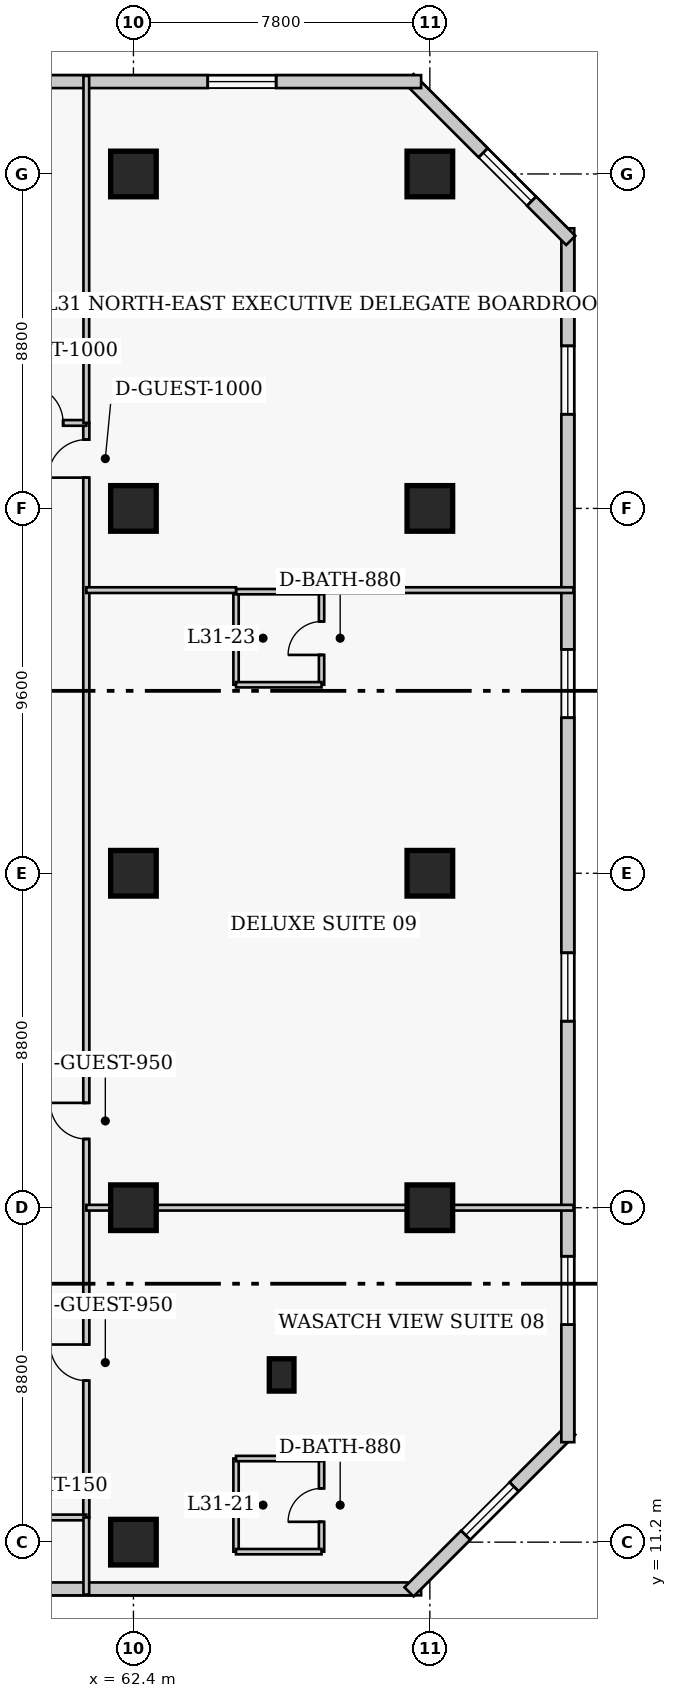
"""IFC4 building model, lengths in metres.
Left out: names, types, materials, properties, quantities, classifications, styles, units other than length and angle.
Written with IfcOpenShell. Run it as: python <this file> out.ifc"""

import sys

from ifc_helpers import new_model, si_unit, direction, frame, frame_2d, origin, origin_2d, place, context, subcontext, project, spatial, rectangle, extrude, element, fill, save


model = new_model("IFC4")
c1 = context("Model", 3, precision=1e-05, world=origin(), true_north=direction((0.0, 1.0)))
c2 = subcontext(c1, "Body", "Model", "MODEL_VIEW")
j1 = project(units=[si_unit("LENGTHUNIT", "METRE"), si_unit("PLANEANGLEUNIT", "RADIAN")], contexts=[c1])
p1 = place(None, origin())
s1 = spatial("IfcSite", under=j1, at=p1, CompositionType="ELEMENT")
p2 = place(p1, origin())
s2 = spatial("IfcBuilding", under=s1, at=p2, CompositionType="ELEMENT")
p3 = place(p2, frame((0.0, 0.0, 126.0)))
s3 = spatial("IfcBuildingStorey", under=s2, at=p3, CompositionType="ELEMENT", Elevation=126.0)
for number, where, z_axis, x_axis in (
    (1, (62.4, 11.2, 0.0), (0.0, 0.0, 1.0), (1.0, 0.0, 0.0)),
    (2, (62.4, 20.0, 0.0), (0.0, 0.0, 1.0), (1.0, 0.0, 0.0)),
    (3, (62.4, 28.8, 0.0), (0.0, 0.0, 1.0), (1.0, 0.0, 0.0)),
    (4, (62.4, 38.4, 0.0), (0.0, 0.0, 1.0), (1.0, 0.0, 0.0)),
    (5, (62.4, 47.2, 0.0), (0.0, 0.0, 1.0), (1.0, 0.0, 0.0)),
    (6, (70.2, 20.0, 0.0), (0.0, 0.0, 1.0), (1.0, 0.0, 0.0)),
    (7, (70.2, 28.8, 0.0), (0.0, 0.0, 1.0), (1.0, 0.0, 0.0)),
    (8, (70.2, 38.4, 0.0), (0.0, 0.0, 1.0), (1.0, 0.0, 0.0)),
    (9, (70.2, 47.2, 0.0), (0.0, 0.0, 1.0), (1.0, 0.0, 0.0)),
):
    element("IfcColumn", number, at=place(p3, frame(where, z_axis=z_axis, x_axis=x_axis)), inside=s3, PredefinedType="COLUMN", context=c2, shape_type="SweptSolid", body=[
        extrude(rectangle(XDim=1.2, YDim=1.2, at=origin_2d()), origin(), (0.0, 0.0, 1.0), 3.8),
    ])
p4 = place(p3, frame((66.3, 15.6, 0.0), z_axis=(0.0, 0.0, 1.0), x_axis=(1.0, 0.0, 0.0)))
e10 = element("IfcColumn", 10, at=p4, inside=s3, PredefinedType="PILASTER", context=c2, shape_type="SweptSolid", body=[
    extrude(rectangle(XDim=0.65, YDim=0.85, at=origin_2d()), origin(), (0.0, 0.0, 1.0), 3.8),
])
p5 = place(p3, frame((41.68, 9.97, 0.0), z_axis=(0.0, 0.0, 1.0), x_axis=(1.0, 0.0, 0.0)))
e11 = element("IfcWall", 11, at=p5, inside=s3, PredefinedType="SOLIDWALL", context=c2, shape_type="SweptSolid", body=[
    extrude(rectangle(XDim=28.29, YDim=0.34, at=frame_2d((14.145, 0.0))), origin(), (0.0, 0.0, 1.0), 3.46),
])
p6 = place(p5, frame((8.32, 0.0, 0.0)))
e12 = element("IfcOpeningElement", 12, at=p6, cuts=e11, PredefinedType="OPENING", context=c2, shape_type="SweptSolid", body=[
    extrude(rectangle(XDim=1.4, YDim=2.15, at=frame_2d((0.7, 1.075))), frame((0.0, 0.18, 0.0), z_axis=(0.0, -1.0, 0.0), x_axis=(1.0, 0.0, 0.0)), (0.0, 0.0, 1.0), 0.36),
])
p7 = place(p5, frame((2.665, 0.0, 0.85)))
e13 = element("IfcOpeningElement", 13, at=p7, cuts=e11, PredefinedType="OPENING", context=c2, shape_type="SweptSolid", body=[
    extrude(rectangle(XDim=1.8, YDim=1.8, at=frame_2d((0.9, 0.9))), frame((0.0, 0.18, 0.0), z_axis=(0.0, -1.0, 0.0), x_axis=(1.0, 0.0, 0.0)), (0.0, 0.0, 1.0), 0.36),
])
p8 = place(p5, frame((13.895, 0.0, 0.85)))
e14 = element("IfcOpeningElement", 14, at=p8, cuts=e11, PredefinedType="OPENING", context=c2, shape_type="SweptSolid", body=[
    extrude(rectangle(XDim=1.8, YDim=1.8, at=frame_2d((0.9, 0.9))), frame((0.0, 0.18, 0.0), z_axis=(0.0, -1.0, 0.0), x_axis=(1.0, 0.0, 0.0)), (0.0, 0.0, 1.0), 0.36),
])
p9 = place(p3, frame((69.652, 9.892, 0.0), z_axis=(0.0, 0.0, 1.0), x_axis=(0.707106781187, 0.707106781187, 0.0)))
e15 = element("IfcWall", 15, at=p9, inside=s3, PredefinedType="SOLIDWALL", context=c2, shape_type="SweptSolid", body=[
    extrude(rectangle(XDim=6.02, YDim=0.34, at=frame_2d((3.01, 0.0))), origin(), (0.0, 0.0, 1.0), 3.46),
])
p10 = place(p9, frame((2.11, 0.0, 0.85)))
e16 = element("IfcOpeningElement", 16, at=p10, cuts=e15, PredefinedType="OPENING", context=c2, shape_type="SweptSolid", body=[
    extrude(rectangle(XDim=1.8, YDim=1.8, at=frame_2d((0.9, 0.9))), frame((0.0, 0.18, 0.0), z_axis=(0.0, -1.0, 0.0), x_axis=(1.0, 0.0, 0.0)), (0.0, 0.0, 1.0), 0.36),
])
p11 = place(p3, frame((73.83, 13.83, 0.0), z_axis=(0.0, 0.0, 1.0), x_axis=(0.0, 1.0, 0.0)))
e17 = element("IfcWall", 17, at=p11, inside=s3, PredefinedType="SOLIDWALL", context=c2, shape_type="SweptSolid", body=[
    extrude(rectangle(XDim=31.94, YDim=0.34, at=frame_2d((15.97, 0.0))), origin(), (0.0, 0.0, 1.0), 3.46),
])
p12 = place(p11, frame((3.093, 0.0, 0.85)))
e18 = element("IfcOpeningElement", 18, at=p12, cuts=e17, PredefinedType="OPENING", context=c2, shape_type="SweptSolid", body=[
    extrude(rectangle(XDim=1.8, YDim=1.8, at=frame_2d((0.9, 0.9))), frame((0.0, 0.18, 0.0), z_axis=(0.0, -1.0, 0.0), x_axis=(1.0, 0.0, 0.0)), (0.0, 0.0, 1.0), 0.36),
])
p13 = place(p11, frame((11.077, 0.0, 0.85)))
e19 = element("IfcOpeningElement", 19, at=p13, cuts=e17, PredefinedType="OPENING", context=c2, shape_type="SweptSolid", body=[
    extrude(rectangle(XDim=1.8, YDim=1.8, at=frame_2d((0.9, 0.9))), frame((0.0, 0.18, 0.0), z_axis=(0.0, -1.0, 0.0), x_axis=(1.0, 0.0, 0.0)), (0.0, 0.0, 1.0), 0.36),
])
p14 = place(p11, frame((19.062, 0.0, 0.85)))
e20 = element("IfcOpeningElement", 20, at=p14, cuts=e17, PredefinedType="OPENING", context=c2, shape_type="SweptSolid", body=[
    extrude(rectangle(XDim=1.8, YDim=1.8, at=frame_2d((0.9, 0.9))), frame((0.0, 0.18, 0.0), z_axis=(0.0, -1.0, 0.0), x_axis=(1.0, 0.0, 0.0)), (0.0, 0.0, 1.0), 0.36),
])
p15 = place(p11, frame((27.048, 0.0, 0.85)))
e21 = element("IfcOpeningElement", 21, at=p15, cuts=e17, PredefinedType="OPENING", context=c2, shape_type="SweptSolid", body=[
    extrude(rectangle(XDim=1.8, YDim=1.8, at=frame_2d((0.9, 0.9))), frame((0.0, 0.18, 0.0), z_axis=(0.0, -1.0, 0.0), x_axis=(1.0, 0.0, 0.0)), (0.0, 0.0, 1.0), 0.36),
])
p16 = place(p3, frame((73.908, 45.451, 0.0), z_axis=(0.0, 0.0, 1.0), x_axis=(-0.707106781187, 0.707106781187, 0.0)))
e22 = element("IfcWall", 22, at=p16, inside=s3, PredefinedType="SOLIDWALL", context=c2, shape_type="SweptSolid", body=[
    extrude(rectangle(XDim=6.02, YDim=0.34, at=frame_2d((3.01, 0.0))), origin(), (0.0, 0.0, 1.0), 3.46),
])
p17 = place(p16, frame((1.46, 0.0, 0.85)))
e23 = element("IfcOpeningElement", 23, at=p17, cuts=e22, PredefinedType="OPENING", context=c2, shape_type="SweptSolid", body=[
    extrude(rectangle(XDim=1.8, YDim=1.8, at=frame_2d((0.9, 0.9))), frame((0.0, 0.18, 0.0), z_axis=(0.0, -1.0, 0.0), x_axis=(1.0, 0.0, 0.0)), (0.0, 0.0, 1.0), 0.36),
])
p18 = place(p3, frame((69.97, 49.63, 0.0), z_axis=(0.0, 0.0, 1.0), x_axis=(-1.0, 0.0, 0.0)))
e24 = element("IfcWall", 24, at=p18, inside=s3, PredefinedType="SOLIDWALL", context=c2, shape_type="SweptSolid", body=[
    extrude(rectangle(XDim=28.29, YDim=0.34, at=frame_2d((14.145, 0.0))), origin(), (0.0, 0.0, 1.0), 3.46),
])
p19 = place(p18, frame((3.815, 0.0, 0.85)))
e25 = element("IfcOpeningElement", 25, at=p19, cuts=e24, PredefinedType="OPENING", context=c2, shape_type="SweptSolid", body=[
    extrude(rectangle(XDim=1.8, YDim=1.8, at=frame_2d((0.9, 0.9))), frame((0.0, 0.18, 0.0), z_axis=(0.0, -1.0, 0.0), x_axis=(1.0, 0.0, 0.0)), (0.0, 0.0, 1.0), 0.36),
])
p20 = place(p18, frame((13.245, 0.0, 0.85)))
e26 = element("IfcOpeningElement", 26, at=p20, cuts=e24, PredefinedType="OPENING", context=c2, shape_type="SweptSolid", body=[
    extrude(rectangle(XDim=1.8, YDim=1.8, at=frame_2d((0.9, 0.9))), frame((0.0, 0.18, 0.0), z_axis=(0.0, -1.0, 0.0), x_axis=(1.0, 0.0, 0.0)), (0.0, 0.0, 1.0), 0.36),
])
p21 = place(p18, frame((22.675, 0.0, 0.85)))
e27 = element("IfcOpeningElement", 27, at=p21, cuts=e24, PredefinedType="OPENING", context=c2, shape_type="SweptSolid", body=[
    extrude(rectangle(XDim=1.8, YDim=1.8, at=frame_2d((0.9, 0.9))), frame((0.0, 0.18, 0.0), z_axis=(0.0, -1.0, 0.0), x_axis=(1.0, 0.0, 0.0)), (0.0, 0.0, 1.0), 0.36),
])
p22 = place(p3, frame((61.16, 11.85, 0.0), z_axis=(0.0, 0.0, 1.0), x_axis=(0.0, 1.0, 0.0)))
e28 = element("IfcWall", 28, at=p22, inside=s3, PredefinedType="PARTITIONING", context=c2, shape_type="SweptSolid", body=[
    extrude(rectangle(XDim=28.8, YDim=0.16, at=frame_2d((14.4, 0.0))), origin(), (0.0, 0.0, 1.0), 3.46),
])
p23 = place(p22, frame((3.6, 0.0, 0.0)))
e29 = element("IfcOpeningElement", 29, at=p23, cuts=e28, PredefinedType="OPENING", context=c2, shape_type="SweptSolid", body=[
    extrude(rectangle(XDim=0.95, YDim=2.1, at=frame_2d((0.475, 1.05))), frame((0.0, 0.09, 0.0), z_axis=(0.0, -1.0, 0.0), x_axis=(1.0, 0.0, 0.0)), (0.0, 0.0, 1.0), 0.18),
])
p24 = place(p22, frame((9.958, 0.0, 0.0)))
e30 = element("IfcOpeningElement", 30, at=p24, cuts=e28, PredefinedType="OPENING", context=c2, shape_type="SweptSolid", body=[
    extrude(rectangle(XDim=0.95, YDim=2.1, at=frame_2d((0.475, 1.05))), frame((0.0, 0.09, 0.0), z_axis=(0.0, -1.0, 0.0), x_axis=(1.0, 0.0, 0.0)), (0.0, 0.0, 1.0), 0.18),
])
p25 = place(p22, frame((27.36, 0.0, 0.0)))
e31 = element("IfcOpeningElement", 31, at=p25, cuts=e28, PredefinedType="OPENING", context=c2, shape_type="SweptSolid", body=[
    extrude(rectangle(XDim=1.0, YDim=2.15, at=frame_2d((0.5, 1.075))), frame((0.0, 0.09, 0.0), z_axis=(0.0, -1.0, 0.0), x_axis=(1.0, 0.0, 0.0)), (0.0, 0.0, 1.0), 0.18),
])
p26 = place(p3, frame((58.94, 11.85, 0.0), z_axis=(0.0, 0.0, 1.0), x_axis=(1.0, 0.0, 0.0)))
e32 = element("IfcWall", 32, at=p26, inside=s3, PredefinedType="PARTITIONING", context=c2, shape_type="SweptSolid", body=[
    extrude(rectangle(XDim=2.22, YDim=0.15, at=frame_2d((1.11, 0.0))), origin(), (0.0, 0.0, 1.0), 3.46),
])
p27 = place(p3, frame((56.8, 40.65, 0.0), z_axis=(0.0, 0.0, 1.0), x_axis=(1.0, 0.0, 0.0)))
e33 = element("IfcWall", 33, at=p27, inside=s3, PredefinedType="PARTITIONING", context=c2, shape_type="SweptSolid", body=[
    extrude(rectangle(XDim=4.36, YDim=0.15, at=frame_2d((2.18, 0.0))), origin(), (0.0, 0.0, 1.0), 3.46),
])
p28 = place(p27, frame((2.75, 0.0, 0.0)))
e34 = element("IfcOpeningElement", 34, at=p28, cuts=e33, PredefinedType="OPENING", context=c2, shape_type="SweptSolid", body=[
    extrude(rectangle(XDim=1.0, YDim=2.15, at=frame_2d((0.5, 1.075))), frame((0.0, 0.085, 0.0), z_axis=(0.0, -1.0, 0.0), x_axis=(1.0, 0.0, 0.0)), (0.0, 0.0, 1.0), 0.17),
])
p29 = place(p3, frame((61.16, 40.65, 0.0), z_axis=(0.0, 0.0, 1.0), x_axis=(0.0, 1.0, 0.0)))
e35 = element("IfcWall", 35, at=p29, inside=s3, PredefinedType="PARTITIONING", context=c2, shape_type="SweptSolid", body=[
    extrude(rectangle(XDim=9.13, YDim=0.15, at=frame_2d((4.565, 0.0))), origin(), (0.0, 0.0, 1.0), 3.46),
])
p30 = place(p3, frame((61.16, 9.82, 0.0), z_axis=(0.0, 0.0, 1.0), x_axis=(0.0, 1.0, 0.0)))
e36 = element("IfcWall", 36, at=p30, inside=s3, PredefinedType="PARTITIONING", context=c2, shape_type="SweptSolid", body=[
    extrude(rectangle(XDim=2.03, YDim=0.15, at=frame_2d((1.015, 0.0))), origin(), (0.0, 0.0, 1.0), 3.46),
])
p31 = place(p3, frame((65.1, 10.95, 0.0), z_axis=(0.0, 0.0, 1.0), x_axis=(0.0, 1.0, 0.0)))
e37 = element("IfcWall", 37, at=p31, inside=s3, PredefinedType="PLUMBINGWALL", context=c2, shape_type="SweptSolid", body=[
    extrude(rectangle(XDim=2.45, YDim=0.14, at=frame_2d((1.225, 0.0))), origin(), (0.0, 0.0, 1.0), 3.46),
])
p32 = place(p3, frame((67.35, 10.95, 0.0), z_axis=(0.0, 0.0, 1.0), x_axis=(0.0, 1.0, 0.0)))
e38 = element("IfcWall", 38, at=p32, inside=s3, PredefinedType="PLUMBINGWALL", context=c2, shape_type="SweptSolid", body=[
    extrude(rectangle(XDim=2.45, YDim=0.14, at=frame_2d((1.225, 0.0))), origin(), (0.0, 0.0, 1.0), 3.46),
])
p33 = place(p32, frame((0.785, 0.0, 0.0)))
e39 = element("IfcOpeningElement", 39, at=p33, cuts=e38, PredefinedType="OPENING", context=c2, shape_type="SweptSolid", body=[
    extrude(rectangle(XDim=0.88, YDim=2.05, at=frame_2d((0.44, 1.025))), frame((0.0, 0.08, 0.0), z_axis=(0.0, -1.0, 0.0), x_axis=(1.0, 0.0, 0.0)), (0.0, 0.0, 1.0), 0.16),
])
for number, where, z_axis, x_axis in (
    (40, (65.1, 10.95, 0.0), (0.0, 0.0, 1.0), (1.0, 0.0, 0.0)),
    (41, (65.1, 13.4, 0.0), (0.0, 0.0, 1.0), (1.0, 0.0, 0.0)),
):
    element("IfcWall", number, at=place(p3, frame(where, z_axis=z_axis, x_axis=x_axis)), inside=s3, PredefinedType="PLUMBINGWALL", context=c2, shape_type="SweptSolid", body=[
        extrude(rectangle(XDim=2.25, YDim=0.14, at=frame_2d((1.125, 0.0))), origin(), (0.0, 0.0, 1.0), 3.46),
    ])
p34 = place(p3, frame((61.16, 20.0, 0.0), z_axis=(0.0, 0.0, 1.0), x_axis=(1.0, 0.0, 0.0)))
e42 = element("IfcWall", 42, at=p34, inside=s3, PredefinedType="PARTITIONING", context=c2, shape_type="SweptSolid", body=[
    extrude(rectangle(XDim=12.82, YDim=0.15, at=frame_2d((6.41, 0.0))), origin(), (0.0, 0.0, 1.0), 2.599),
])
p35 = place(p3, frame((65.1, 33.76, 0.0), z_axis=(0.0, 0.0, 1.0), x_axis=(0.0, 1.0, 0.0)))
e43 = element("IfcWall", 43, at=p35, inside=s3, PredefinedType="PLUMBINGWALL", context=c2, shape_type="SweptSolid", body=[
    extrude(rectangle(XDim=2.45, YDim=0.14, at=frame_2d((1.225, 0.0))), origin(), (0.0, 0.0, 1.0), 3.46),
])
p36 = place(p3, frame((67.35, 33.76, 0.0), z_axis=(0.0, 0.0, 1.0), x_axis=(0.0, 1.0, 0.0)))
e44 = element("IfcWall", 44, at=p36, inside=s3, PredefinedType="PLUMBINGWALL", context=c2, shape_type="SweptSolid", body=[
    extrude(rectangle(XDim=2.45, YDim=0.14, at=frame_2d((1.225, 0.0))), origin(), (0.0, 0.0, 1.0), 3.46),
])
p37 = place(p36, frame((0.785, 0.0, 0.0)))
e45 = element("IfcOpeningElement", 45, at=p37, cuts=e44, PredefinedType="OPENING", context=c2, shape_type="SweptSolid", body=[
    extrude(rectangle(XDim=0.88, YDim=2.05, at=frame_2d((0.44, 1.025))), frame((0.0, 0.08, 0.0), z_axis=(0.0, -1.0, 0.0), x_axis=(1.0, 0.0, 0.0)), (0.0, 0.0, 1.0), 0.16),
])
for number, where, z_axis, x_axis in (
    (46, (65.1, 33.76, 0.0), (0.0, 0.0, 1.0), (1.0, 0.0, 0.0)),
    (47, (65.1, 36.21, 0.0), (0.0, 0.0, 1.0), (1.0, 0.0, 0.0)),
):
    element("IfcWall", number, at=place(p3, frame(where, z_axis=z_axis, x_axis=x_axis)), inside=s3, PredefinedType="PLUMBINGWALL", context=c2, shape_type="SweptSolid", body=[
        extrude(rectangle(XDim=2.25, YDim=0.14, at=frame_2d((1.125, 0.0))), origin(), (0.0, 0.0, 1.0), 3.46),
    ])
p38 = place(p3, frame((61.16, 36.25, 0.0), z_axis=(0.0, 0.0, 1.0), x_axis=(1.0, 0.0, 0.0)))
e48 = element("IfcWall", 48, at=p38, inside=s3, PredefinedType="PARTITIONING", context=c2, shape_type="SweptSolid", body=[
    extrude(rectangle(XDim=3.94, YDim=0.15, at=frame_2d((1.97, 0.0))), origin(), (0.0, 0.0, 1.0), 3.46),
])
p39 = place(p3, frame((67.35, 36.25, 0.0), z_axis=(0.0, 0.0, 1.0), x_axis=(1.0, 0.0, 0.0)))
e49 = element("IfcWall", 49, at=p39, inside=s3, PredefinedType="PARTITIONING", context=c2, shape_type="SweptSolid", body=[
    extrude(rectangle(XDim=6.63, YDim=0.15, at=frame_2d((3.315, 0.0))), origin(), (0.0, 0.0, 1.0), 3.46),
])
p40 = place(p10, origin())
e50 = element("IfcWindow", 50, at=p40, inside=s3, PartitioningType="SINGLE_PANEL", PredefinedType="WINDOW", context=c2, shape_type="SweptSolid", body=[
    extrude(rectangle(XDim=1.8, YDim=1.8, at=frame_2d((0.9, 0.9))), frame((0.0, 0.03, 0.0), z_axis=(0.0, -1.0, 0.0), x_axis=(1.0, 0.0, 0.0)), (0.0, 0.0, 1.0), 0.06),
])
fill(e16, e50)
p41 = place(p12, origin())
e51 = element("IfcWindow", 51, at=p41, inside=s3, PartitioningType="SINGLE_PANEL", PredefinedType="WINDOW", context=c2, shape_type="SweptSolid", body=[
    extrude(rectangle(XDim=1.8, YDim=1.8, at=frame_2d((0.9, 0.9))), frame((0.0, 0.03, 0.0), z_axis=(0.0, -1.0, 0.0), x_axis=(1.0, 0.0, 0.0)), (0.0, 0.0, 1.0), 0.06),
])
fill(e18, e51)
p42 = place(p13, origin())
e52 = element("IfcWindow", 52, at=p42, inside=s3, PartitioningType="SINGLE_PANEL", PredefinedType="WINDOW", context=c2, shape_type="SweptSolid", body=[
    extrude(rectangle(XDim=1.8, YDim=1.8, at=frame_2d((0.9, 0.9))), frame((0.0, 0.03, 0.0), z_axis=(0.0, -1.0, 0.0), x_axis=(1.0, 0.0, 0.0)), (0.0, 0.0, 1.0), 0.06),
])
fill(e19, e52)
p43 = place(p14, origin())
e53 = element("IfcWindow", 53, at=p43, inside=s3, PartitioningType="SINGLE_PANEL", PredefinedType="WINDOW", context=c2, shape_type="SweptSolid", body=[
    extrude(rectangle(XDim=1.8, YDim=1.8, at=frame_2d((0.9, 0.9))), frame((0.0, 0.03, 0.0), z_axis=(0.0, -1.0, 0.0), x_axis=(1.0, 0.0, 0.0)), (0.0, 0.0, 1.0), 0.06),
])
fill(e20, e53)
p44 = place(p15, origin())
e54 = element("IfcWindow", 54, at=p44, inside=s3, PartitioningType="SINGLE_PANEL", PredefinedType="WINDOW", context=c2, shape_type="SweptSolid", body=[
    extrude(rectangle(XDim=1.8, YDim=1.8, at=frame_2d((0.9, 0.9))), frame((0.0, 0.03, 0.0), z_axis=(0.0, -1.0, 0.0), x_axis=(1.0, 0.0, 0.0)), (0.0, 0.0, 1.0), 0.06),
])
fill(e21, e54)
p45 = place(p17, origin())
e55 = element("IfcWindow", 55, at=p45, inside=s3, PartitioningType="SINGLE_PANEL", PredefinedType="WINDOW", context=c2, shape_type="SweptSolid", body=[
    extrude(rectangle(XDim=1.8, YDim=1.8, at=frame_2d((0.9, 0.9))), frame((0.0, 0.03, 0.0), z_axis=(0.0, -1.0, 0.0), x_axis=(1.0, 0.0, 0.0)), (0.0, 0.0, 1.0), 0.06),
])
fill(e23, e55)
p46 = place(p19, origin())
e56 = element("IfcWindow", 56, at=p46, inside=s3, PartitioningType="SINGLE_PANEL", PredefinedType="WINDOW", context=c2, shape_type="SweptSolid", body=[
    extrude(rectangle(XDim=1.8, YDim=1.8, at=frame_2d((0.9, 0.9))), frame((0.0, 0.03, 0.0), z_axis=(0.0, -1.0, 0.0), x_axis=(1.0, 0.0, 0.0)), (0.0, 0.0, 1.0), 0.06),
])
fill(e25, e56)
p47 = place(p28, origin())
e57 = element("IfcDoor", 57, at=p47, inside=s3, OperationType="SINGLE_SWING_LEFT", PredefinedType="DOOR", context=c2, shape_type="SweptSolid", body=[
    extrude(rectangle(XDim=1.0, YDim=2.15, at=frame_2d((0.5, 1.075))), frame((0.0, 0.025, 0.0), z_axis=(0.0, -1.0, 0.0), x_axis=(1.0, 0.0, 0.0)), (0.0, 0.0, 1.0), 0.05),
])
fill(e34, e57)
p48 = place(p33, origin())
e58 = element("IfcDoor", 58, at=p48, inside=s3, OperationType="SINGLE_SWING_LEFT", PredefinedType="DOOR", context=c2, shape_type="SweptSolid", body=[
    extrude(rectangle(XDim=0.88, YDim=2.05, at=frame_2d((0.44, 1.025))), frame((0.0, 0.025, 0.0), z_axis=(0.0, -1.0, 0.0), x_axis=(1.0, 0.0, 0.0)), (0.0, 0.0, 1.0), 0.05),
])
fill(e39, e58)
p49 = place(p23, origin())
e59 = element("IfcDoor", 59, at=p49, inside=s3, OperationType="SINGLE_SWING_RIGHT", PredefinedType="DOOR", context=c2, shape_type="SweptSolid", body=[
    extrude(rectangle(XDim=0.95, YDim=2.1, at=frame_2d((0.475, 1.05))), frame((0.0, 0.025, 0.0), z_axis=(0.0, -1.0, 0.0), x_axis=(1.0, 0.0, 0.0)), (0.0, 0.0, 1.0), 0.05),
])
fill(e29, e59)
p50 = place(p37, origin())
e60 = element("IfcDoor", 60, at=p50, inside=s3, OperationType="SINGLE_SWING_LEFT", PredefinedType="DOOR", context=c2, shape_type="SweptSolid", body=[
    extrude(rectangle(XDim=0.88, YDim=2.05, at=frame_2d((0.44, 1.025))), frame((0.0, 0.025, 0.0), z_axis=(0.0, -1.0, 0.0), x_axis=(1.0, 0.0, 0.0)), (0.0, 0.0, 1.0), 0.05),
])
fill(e45, e60)
p51 = place(p24, origin())
e61 = element("IfcDoor", 61, at=p51, inside=s3, OperationType="SINGLE_SWING_RIGHT", PredefinedType="DOOR", context=c2, shape_type="SweptSolid", body=[
    extrude(rectangle(XDim=0.95, YDim=2.1, at=frame_2d((0.475, 1.05))), frame((0.0, 0.025, 0.0), z_axis=(0.0, -1.0, 0.0), x_axis=(1.0, 0.0, 0.0)), (0.0, 0.0, 1.0), 0.05),
])
fill(e30, e61)
p52 = place(p25, origin())
e62 = element("IfcDoor", 62, at=p52, inside=s3, OperationType="SINGLE_SWING_LEFT", PredefinedType="DOOR", context=c2, shape_type="SweptSolid", body=[
    extrude(rectangle(XDim=1.0, YDim=2.15, at=frame_2d((0.5, 1.075))), frame((0.0, 0.025, 0.0), z_axis=(0.0, -1.0, 0.0), x_axis=(1.0, 0.0, 0.0)), (0.0, 0.0, 1.0), 0.05),
])
fill(e31, e62)
save(model, sys.argv[1])
